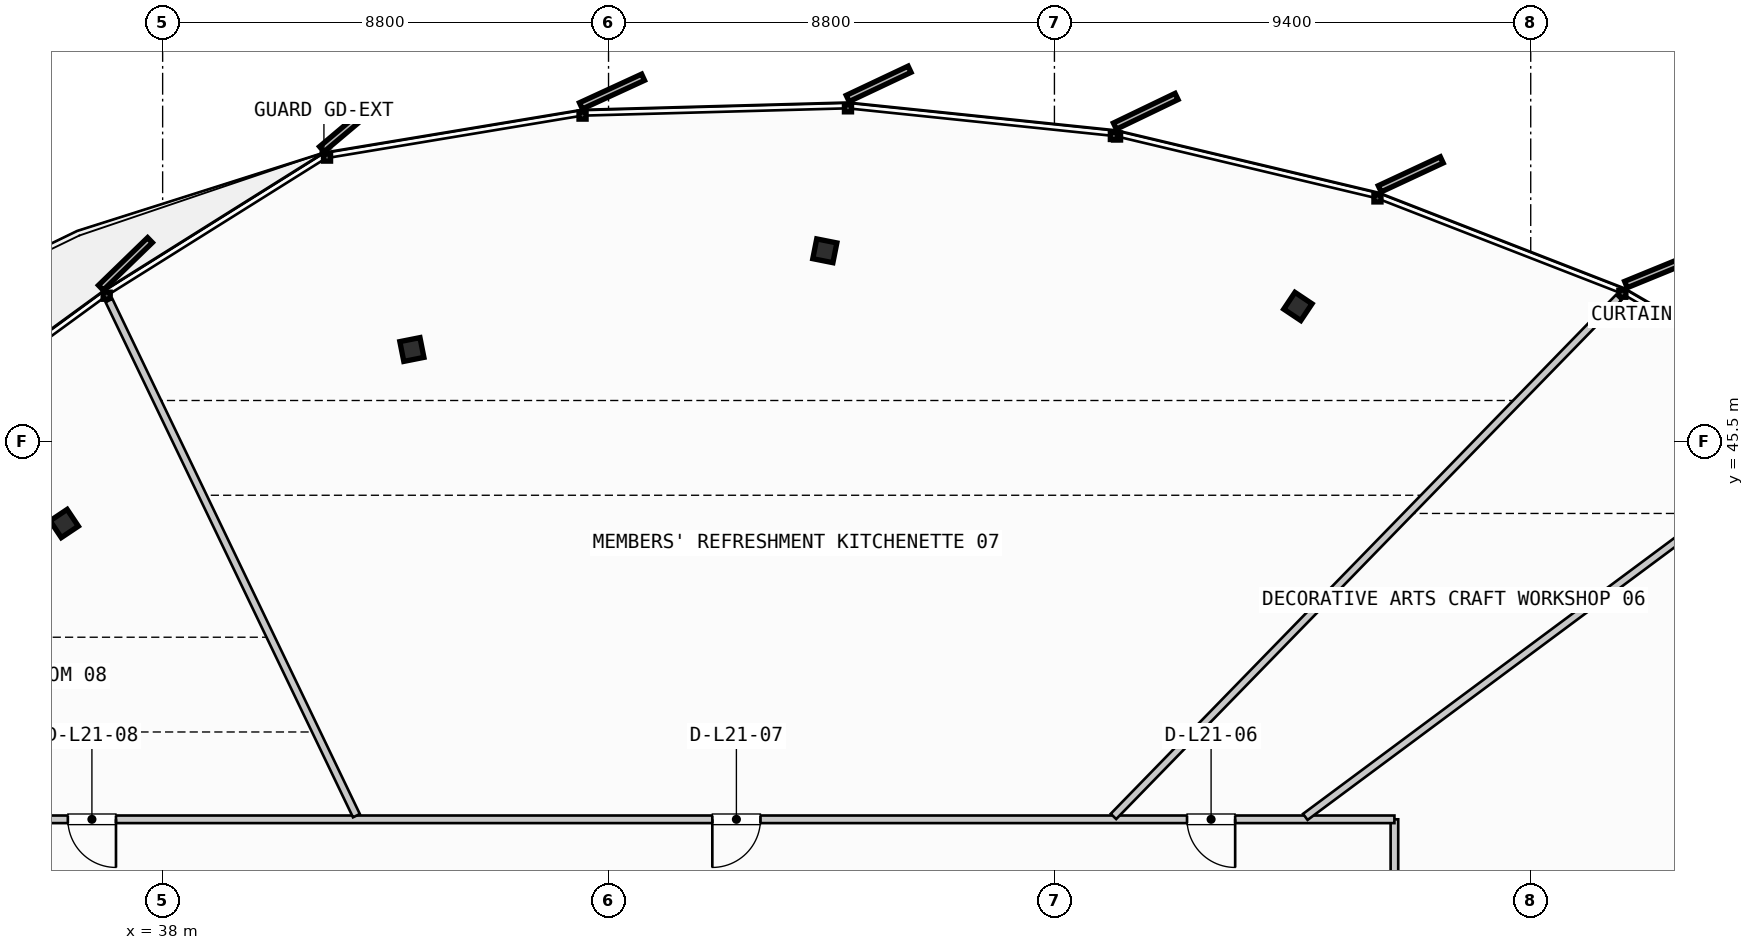
"""IFC4 building model, lengths in metres.
Left out: names, types, materials, properties, quantities, classifications, styles, units other than length and angle.
Written with IfcOpenShell. Run it as: python <this file> out.ifc"""

import sys

from ifc_helpers import new_model, si_unit, direction, frame, frame_2d, origin, origin_2d, place, context, subcontext, project, spatial, rectangle, i_section, extrude, source, transform, mapped, element, fill, save


model = new_model("IFC4")
c1 = context("Model", 3, precision=1e-05, world=origin(), true_north=direction((0.0, 1.0)))
c2 = subcontext(c1, "Body", "Model", "MODEL_VIEW")
j1 = project(units=[si_unit("LENGTHUNIT", "METRE"), si_unit("PLANEANGLEUNIT", "RADIAN")], contexts=[c1])
p1 = place(None, origin())
s1 = spatial("IfcSite", under=j1, at=p1, CompositionType="ELEMENT")
p2 = place(p1, origin())
s2 = spatial("IfcBuilding", under=s1, at=p2, CompositionType="ELEMENT")
p3 = place(p2, frame((0.0, 0.0, 89.2)))
s3 = spatial("IfcBuildingStorey", under=s2, at=p3, CompositionType="ELEMENT", Elevation=89.2)
m1 = source(origin(), c2, "Body", "SweptSolid", [
    extrude(i_section(OverallWidth=0.405, OverallDepth=0.398, WebThickness=0.035, FlangeThickness=0.056, FilletRadius=0.015, at=origin_2d()), origin(), (0.0, 0.0, 1.0), 3.35),
])
for number, where, z_axis, x_axis in (
    (1, (60.405, 48.161, 0.0), (0.0, 0.0, 1.0), (0.556, 0.831, 0.0)),
    (2, (51.069, 49.259, 0.0), (0.0, 0.0, 1.0), (0.195, 0.981, 0.0)),
    (3, (42.919, 47.311, 0.0), (0.0, 0.0, 1.0), (-0.195, 0.981, 0.0)),
    (4, (36.058, 43.877, 0.0), (0.0, 0.0, 1.0), (-0.556, 0.831, 0.0)),
):
    element("IfcColumn", number, at=place(p3, frame(where, z_axis=z_axis, x_axis=x_axis)), inside=s3, PredefinedType="COLUMN", context=c2, shape_type="MappedRepresentation", body=[
        mapped(m1, transform((0.0, 0.0, 0.0), scale=1.0)),
    ])
p4 = place(p3, frame((62.31, 17.98, 0.0), z_axis=(0.0, 0.0, 1.0), x_axis=(0.0, 1.0, 0.0)))
e5 = element("IfcWall", 5, at=p4, inside=s3, PredefinedType="PARTITIONING", context=c2, shape_type="SweptSolid", body=[
    extrude(rectangle(XDim=20.06, YDim=0.15, at=frame_2d((10.03, 0.0))), origin(), (0.0, 0.0, 1.0), 2.28),
])
p5 = place(p4, frame((4.519, 0.0, 0.0)))
e6 = element("IfcOpeningElement", 6, at=p5, cuts=e5, PredefinedType="OPENING", context=c2, shape_type="SweptSolid", body=[
    extrude(rectangle(XDim=0.95, YDim=2.15, at=frame_2d((0.475, 1.075))), frame((0.0, 0.085, 0.0), z_axis=(0.0, -1.0, 0.0), x_axis=(1.0, 0.0, 0.0)), (0.0, 0.0, 1.0), 0.17),
])
p6 = place(p4, frame((13.969, 0.0, 0.0)))
e7 = element("IfcOpeningElement", 7, at=p6, cuts=e5, PredefinedType="OPENING", context=c2, shape_type="SweptSolid", body=[
    extrude(rectangle(XDim=0.95, YDim=2.15, at=frame_2d((0.475, 1.075))), frame((0.0, 0.085, 0.0), z_axis=(0.0, -1.0, 0.0), x_axis=(1.0, 0.0, 0.0)), (0.0, 0.0, 1.0), 0.17),
])
p7 = place(p3, frame((62.31, 38.04, 0.0), z_axis=(0.0, 0.0, 1.0), x_axis=(-1.0, 0.0, 0.0)))
e8 = element("IfcWall", 8, at=p7, inside=s3, PredefinedType="PARTITIONING", context=c2, shape_type="SweptSolid", body=[
    extrude(rectangle(XDim=31.54, YDim=0.15, at=frame_2d((15.77, 0.0))), origin(), (0.0, 0.0, 1.0), 2.28),
])
p8 = place(p7, frame((3.143, 0.0, 0.0)))
e9 = element("IfcOpeningElement", 9, at=p8, cuts=e8, PredefinedType="OPENING", context=c2, shape_type="SweptSolid", body=[
    extrude(rectangle(XDim=0.95, YDim=2.15, at=frame_2d((0.475, 1.075))), frame((0.0, 0.085, 0.0), z_axis=(0.0, -1.0, 0.0), x_axis=(1.0, 0.0, 0.0)), (0.0, 0.0, 1.0), 0.17),
])
p9 = place(p7, frame((12.512, 0.0, 0.0)))
e10 = element("IfcOpeningElement", 10, at=p9, cuts=e8, PredefinedType="OPENING", context=c2, shape_type="SweptSolid", body=[
    extrude(rectangle(XDim=0.95, YDim=2.15, at=frame_2d((0.475, 1.075))), frame((0.0, 0.085, 0.0), z_axis=(0.0, -1.0, 0.0), x_axis=(1.0, 0.0, 0.0)), (0.0, 0.0, 1.0), 0.17),
])
p10 = place(p7, frame((25.231, 0.0, 0.0)))
e11 = element("IfcOpeningElement", 11, at=p10, cuts=e8, PredefinedType="OPENING", context=c2, shape_type="SweptSolid", body=[
    extrude(rectangle(XDim=0.95, YDim=2.15, at=frame_2d((0.475, 1.075))), frame((0.0, 0.085, 0.0), z_axis=(0.0, -1.0, 0.0), x_axis=(1.0, 0.0, 0.0)), (0.0, 0.0, 1.0), 0.17),
])
p11 = place(p3, frame((60.551, 38.088, 0.0), z_axis=(0.0, 0.0, 1.0), x_axis=(0.802739746864, 0.596329521997, 0.0)))
e12 = element("IfcWall", 12, at=p11, inside=s3, PredefinedType="PARTITIONING", context=c2, shape_type="SweptSolid", body=[
    extrude(rectangle(XDim=13.027, YDim=0.15, at=frame_2d((6.514, 0.0))), origin(), (0.0, 0.0, 1.0), 2.28),
])
p12 = place(p3, frame((56.765, 38.097, 0.0), z_axis=(0.0, 0.0, 1.0), x_axis=(0.697622683168, 0.716465345938, 0.0)))
e13 = element("IfcWall", 13, at=p12, inside=s3, PredefinedType="PARTITIONING", context=c2, shape_type="SweptSolid", body=[
    extrude(rectangle(XDim=14.291, YDim=0.15, at=frame_2d((7.146, 0.0))), origin(), (0.0, 0.0, 1.0), 2.28),
])
p13 = place(p3, frame((41.824, 38.112, 0.0), z_axis=(0.0, 0.0, 1.0), x_axis=(-0.432973848558, 0.901406482373, 0.0)))
e14 = element("IfcWall", 14, at=p13, inside=s3, PredefinedType="PARTITIONING", context=c2, shape_type="SweptSolid", body=[
    extrude(rectangle(XDim=11.278, YDim=0.15, at=frame_2d((5.639, 0.0))), origin(), (0.0, 0.0, 1.0), 2.28),
])
m2 = source(origin(), c2, "Body", "SweptSolid", [
    extrude(rectangle(XDim=0.95, YDim=2.15, at=frame_2d((0.475, 1.075))), frame((0.0, 0.025, 0.0), z_axis=(0.0, -1.0, 0.0), x_axis=(1.0, 0.0, 0.0)), (0.0, 0.0, 1.0), 0.05),
])
p14 = place(p8, origin())
e15 = element("IfcDoor", 15, at=p14, inside=s3, OperationType="SINGLE_SWING_LEFT", PredefinedType="DOOR", context=c2, shape_type="MappedRepresentation", body=[
    mapped(m2, transform((0.0, 0.0, 0.0), scale=1.0)),
])
fill(e9, e15)
p15 = place(p9, origin())
e16 = element("IfcDoor", 16, at=p15, inside=s3, OperationType="SINGLE_SWING_RIGHT", PredefinedType="DOOR", context=c2, shape_type="MappedRepresentation", body=[
    mapped(m2, transform((0.0, 0.0, 0.0), scale=1.0)),
])
fill(e10, e16)
p16 = place(p10, origin())
e17 = element("IfcDoor", 17, at=p16, inside=s3, OperationType="SINGLE_SWING_LEFT", PredefinedType="DOOR", context=c2, shape_type="MappedRepresentation", body=[
    mapped(m2, transform((0.0, 0.0, 0.0), scale=1.0)),
])
fill(e11, e17)
save(model, sys.argv[1])
